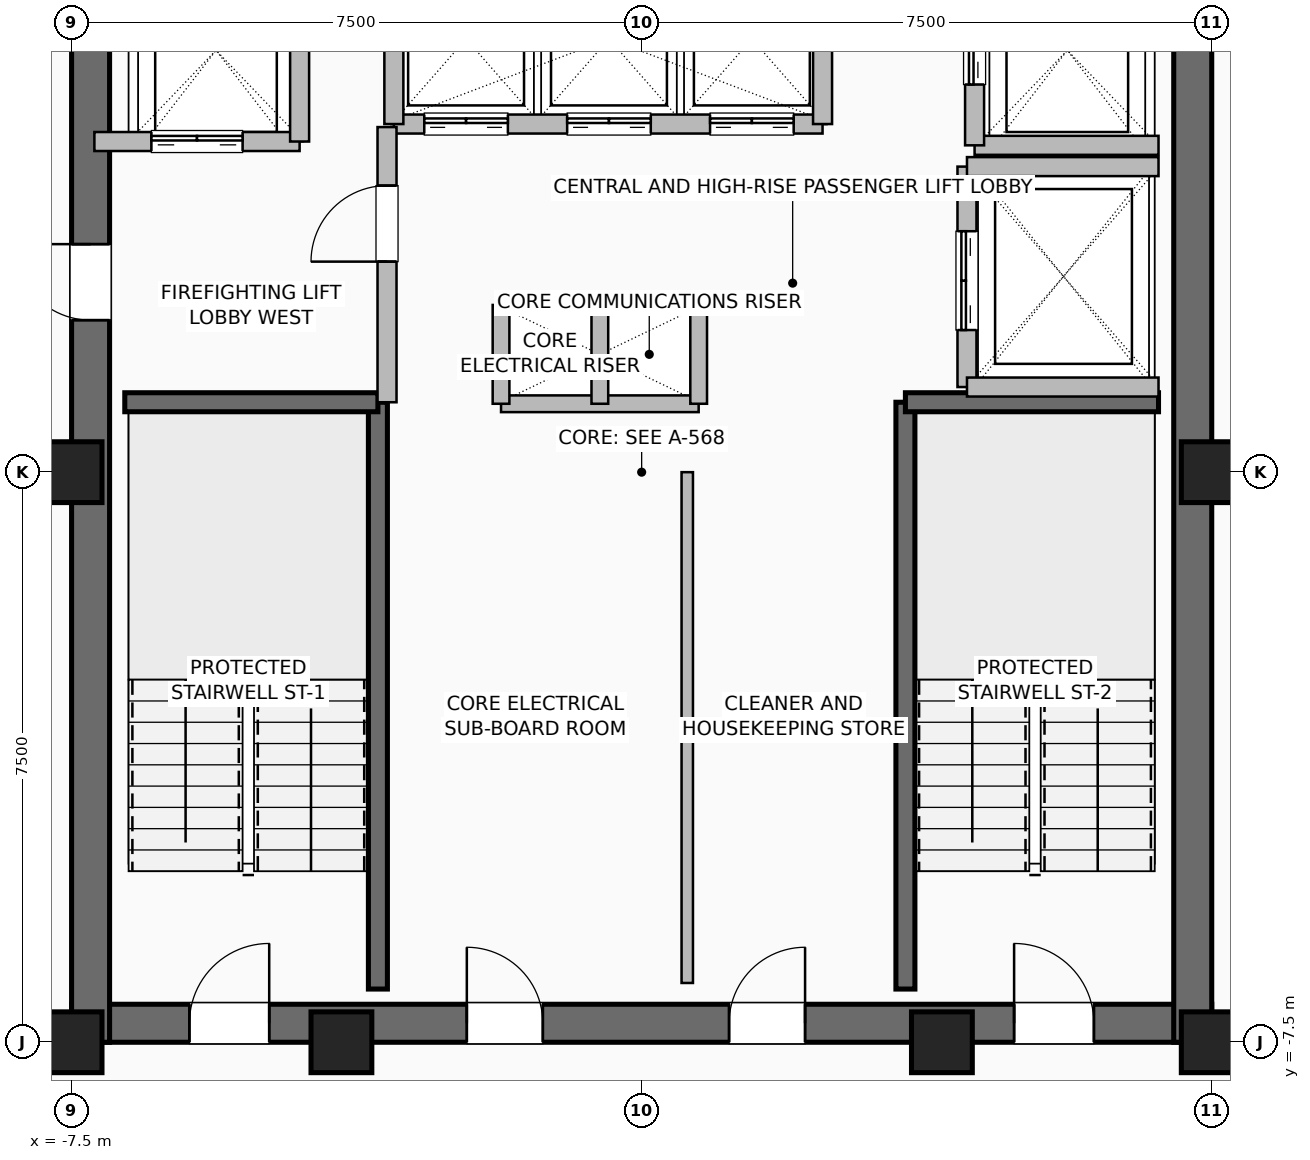
"""IFC4 building model, lengths in metres.
Left out: names, types, materials, properties, quantities, classifications, styles, units other than length and angle.
Written with IfcOpenShell. Run it as: python <this file> out.ifc"""

import sys

from ifc_helpers import new_model, si_unit, direction, frame, frame_2d, origin, origin_2d, place, context, subcontext, project, spatial, rectangle, hollow_rectangle, extrude, element, fill, save


model = new_model("IFC4")
c1 = context("Model", 3, precision=1e-05, world=origin(), true_north=direction((0.0, 1.0)))
c2 = subcontext(c1, "Body", "Model", "MODEL_VIEW")
j1 = project(units=[si_unit("LENGTHUNIT", "METRE"), si_unit("PLANEANGLEUNIT", "RADIAN")], contexts=[c1])
p1 = place(None, origin())
s1 = spatial("IfcSite", under=j1, at=p1, CompositionType="ELEMENT")
p2 = place(p1, origin())
s2 = spatial("IfcBuilding", under=s1, at=p2, CompositionType="ELEMENT")
p3 = place(p2, frame((0.0, 0.0, 272.0)))
s3 = spatial("IfcBuildingStorey", under=s2, at=p3, CompositionType="ELEMENT", Elevation=272.0)
for number, where, z_axis, x_axis in (
    (1, (-7.5, -7.5, 0.0), (0.0, 0.0, 1.0), (1.0, 0.0, 0.0)),
    (2, (-3.95, -7.5, 0.0), (0.0, 0.0, 1.0), (1.0, 0.0, 0.0)),
    (3, (3.95, -7.5, 0.0), (0.0, 0.0, 1.0), (1.0, 0.0, 0.0)),
    (4, (7.5, -7.5, 0.0), (0.0, 0.0, 1.0), (1.0, 0.0, 0.0)),
    (5, (7.5, 0.0, 0.0), (0.0, 0.0, 1.0), (1.0, 0.0, 0.0)),
    (6, (-7.5, 0.0, 0.0), (0.0, 0.0, 1.0), (1.0, 0.0, 0.0)),
):
    element("IfcColumn", number, at=place(p3, frame(where, z_axis=z_axis, x_axis=x_axis)), inside=s3, PredefinedType="COLUMN", context=c2, shape_type="SweptSolid", body=[
        extrude(hollow_rectangle(XDim=0.8, YDim=0.8, WallThickness=0.04, at=origin_2d()), origin(), (0.0, 0.0, 1.0), 3.6),
    ])
p4 = place(p3, frame((-7.5, -7.25, 0.0), z_axis=(0.0, 0.0, 1.0), x_axis=(1.0, 0.0, 0.0)))
e7 = element("IfcWall", 7, at=p4, inside=s3, PredefinedType="SHEAR", context=c2, shape_type="SweptSolid", body=[
    extrude(rectangle(XDim=15.0, YDim=0.5, at=frame_2d((7.5, 0.0))), origin(), (0.0, 0.0, 1.0), 3.36),
])
p5 = place(p4, frame((1.55, 0.0, 0.0)))
e8 = element("IfcOpeningElement", 8, at=p5, cuts=e7, PredefinedType="OPENING", context=c2, shape_type="SweptSolid", body=[
    extrude(rectangle(XDim=1.05, YDim=2.08, at=frame_2d((0.525, 1.04))), frame((0.0, 0.26, 0.0), z_axis=(0.0, -1.0, 0.0), x_axis=(1.0, 0.0, 0.0)), (0.0, 0.0, 1.0), 0.52),
])
p6 = place(p4, frame((12.4, 0.0, 0.0)))
e9 = element("IfcOpeningElement", 9, at=p6, cuts=e7, PredefinedType="OPENING", context=c2, shape_type="SweptSolid", body=[
    extrude(rectangle(XDim=1.05, YDim=2.08, at=frame_2d((0.525, 1.04))), frame((0.0, 0.26, 0.0), z_axis=(0.0, -1.0, 0.0), x_axis=(1.0, 0.0, 0.0)), (0.0, 0.0, 1.0), 0.52),
])
p7 = place(p4, frame((5.2, 0.0, 0.0)))
e10 = element("IfcOpeningElement", 10, at=p7, cuts=e7, PredefinedType="OPENING", context=c2, shape_type="SweptSolid", body=[
    extrude(rectangle(XDim=1.0, YDim=2.08, at=frame_2d((0.5, 1.04))), frame((0.0, 0.26, 0.0), z_axis=(0.0, -1.0, 0.0), x_axis=(1.0, 0.0, 0.0)), (0.0, 0.0, 1.0), 0.52),
])
p8 = place(p4, frame((8.65, 0.0, 0.0)))
e11 = element("IfcOpeningElement", 11, at=p8, cuts=e7, PredefinedType="OPENING", context=c2, shape_type="SweptSolid", body=[
    extrude(rectangle(XDim=1.0, YDim=2.08, at=frame_2d((0.5, 1.04))), frame((0.0, 0.26, 0.0), z_axis=(0.0, -1.0, 0.0), x_axis=(1.0, 0.0, 0.0)), (0.0, 0.0, 1.0), 0.52),
])
p9 = place(p3, frame((-7.25, -7.5, 0.0), z_axis=(0.0, 0.0, 1.0), x_axis=(0.0, 1.0, 0.0)))
e12 = element("IfcWall", 12, at=p9, inside=s3, PredefinedType="SHEAR", context=c2, shape_type="SweptSolid", body=[
    extrude(rectangle(XDim=15.0, YDim=0.5, at=frame_2d((7.5, 0.0))), origin(), (0.0, 0.0, 1.0), 3.36),
])
p10 = place(p9, frame((9.5, 0.0, 0.0)))
e13 = element("IfcOpeningElement", 13, at=p10, cuts=e12, PredefinedType="OPENING", context=c2, shape_type="SweptSolid", body=[
    extrude(rectangle(XDim=1.0, YDim=2.08, at=frame_2d((0.5, 1.04))), frame((0.0, 0.26, 0.0), z_axis=(0.0, -1.0, 0.0), x_axis=(1.0, 0.0, 0.0)), (0.0, 0.0, 1.0), 0.52),
])
p11 = place(p3, frame((7.25, -7.5, 0.0), z_axis=(0.0, 0.0, 1.0), x_axis=(0.0, 1.0, 0.0)))
e14 = element("IfcWall", 14, at=p11, inside=s3, PredefinedType="SHEAR", context=c2, shape_type="SweptSolid", body=[
    extrude(rectangle(XDim=15.0, YDim=0.5, at=frame_2d((7.5, 0.0))), origin(), (0.0, 0.0, 1.0), 3.36),
])
p12 = place(p3, frame((-3.47, -6.8, 0.0), z_axis=(0.0, 0.0, 1.0), x_axis=(0.0, 1.0, 0.0)))
e15 = element("IfcWall", 15, at=p12, inside=s3, PredefinedType="SHEAR", context=c2, shape_type="SweptSolid", body=[
    extrude(rectangle(XDim=7.72, YDim=0.25, at=frame_2d((3.86, 0.0))), origin(), (0.0, 0.0, 1.0), 3.36),
])
p13 = place(p3, frame((-6.8, 0.92, 0.0), z_axis=(0.0, 0.0, 1.0), x_axis=(1.0, 0.0, 0.0)))
e16 = element("IfcWall", 16, at=p13, inside=s3, PredefinedType="SHEAR", context=c2, shape_type="SweptSolid", body=[
    extrude(rectangle(XDim=3.33, YDim=0.25, at=frame_2d((1.665, 0.0))), origin(), (0.0, 0.0, 1.0), 3.36),
])
p14 = place(p3, frame((3.47, -6.8, 0.0), z_axis=(0.0, 0.0, 1.0), x_axis=(0.0, 1.0, 0.0)))
e17 = element("IfcWall", 17, at=p14, inside=s3, PredefinedType="SHEAR", context=c2, shape_type="SweptSolid", body=[
    extrude(rectangle(XDim=7.72, YDim=0.25, at=frame_2d((3.86, 0.0))), origin(), (0.0, 0.0, 1.0), 3.36),
])
p15 = place(p3, frame((3.47, 0.92, 0.0), z_axis=(0.0, 0.0, 1.0), x_axis=(1.0, 0.0, 0.0)))
e18 = element("IfcWall", 18, at=p15, inside=s3, PredefinedType="SHEAR", context=c2, shape_type="SweptSolid", body=[
    extrude(rectangle(XDim=3.33, YDim=0.25, at=frame_2d((1.665, 0.0))), origin(), (0.0, 0.0, 1.0), 3.36),
])
for number, where, z_axis, x_axis in (
    (19, (-1.85, 2.2, 0.0), (0.0, 0.0, 1.0), (1.0, 0.0, 0.0)),
    (20, (-1.85, 0.9, 0.0), (0.0, 0.0, 1.0), (1.0, 0.0, 0.0)),
):
    element("IfcWall", number, at=place(p3, frame(where, z_axis=z_axis, x_axis=x_axis)), inside=s3, PredefinedType="PARTITIONING", context=c2, shape_type="SweptSolid", body=[
        extrude(rectangle(XDim=2.6, YDim=0.22, at=frame_2d((1.3, 0.0))), origin(), (0.0, 0.0, 1.0), 3.36),
    ])
for number, where, z_axis, x_axis in (
    (21, (-0.55, 0.9, 0.0), (0.0, 0.0, 1.0), (0.0, 1.0, 0.0)),
    (22, (0.75, 0.9, 0.0), (0.0, 0.0, 1.0), (0.0, 1.0, 0.0)),
    (23, (-1.85, 0.9, 0.0), (0.0, 0.0, 1.0), (0.0, 1.0, 0.0)),
):
    element("IfcWall", number, at=place(p3, frame(where, z_axis=z_axis, x_axis=x_axis)), inside=s3, PredefinedType="PARTITIONING", context=c2, shape_type="SweptSolid", body=[
        extrude(rectangle(XDim=1.3, YDim=0.22, at=frame_2d((0.65, 0.0))), origin(), (0.0, 0.0, 1.0), 3.36),
    ])
p16 = place(p3, frame((-3.26, 4.58, 0.0), z_axis=(0.0, 0.0, 1.0), x_axis=(1.0, 0.0, 0.0)))
e24 = element("IfcWall", 24, at=p16, inside=s3, PredefinedType="SHEAR", context=c2, shape_type="SweptSolid", body=[
    extrude(rectangle(XDim=5.64, YDim=0.25, at=frame_2d((2.82, 0.0))), origin(), (0.0, 0.0, 1.0), 3.36),
])
p17 = place(p16, frame((0.4, 0.0, 0.0)))
e25 = element("IfcOpeningElement", 25, at=p17, cuts=e24, PredefinedType="OPENING", context=c2, shape_type="SweptSolid", body=[
    extrude(rectangle(XDim=1.1, YDim=2.2, at=frame_2d((0.55, 1.1))), frame((0.0, 0.135, 0.0), z_axis=(0.0, -1.0, 0.0), x_axis=(1.0, 0.0, 0.0)), (0.0, 0.0, 1.0), 0.27),
])
p18 = place(p16, frame((2.28, 0.0, 0.0)))
e26 = element("IfcOpeningElement", 26, at=p18, cuts=e24, PredefinedType="OPENING", context=c2, shape_type="SweptSolid", body=[
    extrude(rectangle(XDim=1.1, YDim=2.2, at=frame_2d((0.55, 1.1))), frame((0.0, 0.135, 0.0), z_axis=(0.0, -1.0, 0.0), x_axis=(1.0, 0.0, 0.0)), (0.0, 0.0, 1.0), 0.27),
])
p19 = place(p16, frame((4.16, 0.0, 0.0)))
e27 = element("IfcOpeningElement", 27, at=p19, cuts=e24, PredefinedType="OPENING", context=c2, shape_type="SweptSolid", body=[
    extrude(rectangle(XDim=1.1, YDim=2.2, at=frame_2d((0.55, 1.1))), frame((0.0, 0.135, 0.0), z_axis=(0.0, -1.0, 0.0), x_axis=(1.0, 0.0, 0.0)), (0.0, 0.0, 1.0), 0.27),
])
for number, where, z_axis, x_axis in (
    (28, (-3.26, 4.58, 0.0), (0.0, 0.0, 1.0), (0.0, 1.0, 0.0)),
    (29, (2.38, 4.58, 0.0), (0.0, 0.0, 1.0), (0.0, 1.0, 0.0)),
):
    element("IfcWall", number, at=place(p3, frame(where, z_axis=z_axis, x_axis=x_axis)), inside=s3, PredefinedType="SHEAR", context=c2, shape_type="SweptSolid", body=[
        extrude(rectangle(XDim=2.22, YDim=0.25, at=frame_2d((1.11, 0.0))), origin(), (0.0, 0.0, 1.0), 3.36),
    ])
p20 = place(p3, frame((-7.2, 4.35, 0.0), z_axis=(0.0, 0.0, 1.0), x_axis=(1.0, 0.0, 0.0)))
e30 = element("IfcWall", 30, at=p20, inside=s3, PredefinedType="SHEAR", context=c2, shape_type="SweptSolid", body=[
    extrude(rectangle(XDim=2.7, YDim=0.25, at=frame_2d((1.35, 0.0))), origin(), (0.0, 0.0, 1.0), 3.36),
])
p21 = place(p20, frame((0.75, 0.0, 0.0)))
e31 = element("IfcOpeningElement", 31, at=p21, cuts=e30, PredefinedType="OPENING", context=c2, shape_type="SweptSolid", body=[
    extrude(rectangle(XDim=1.2, YDim=2.2, at=frame_2d((0.6, 1.1))), frame((0.0, 0.135, 0.0), z_axis=(0.0, -1.0, 0.0), x_axis=(1.0, 0.0, 0.0)), (0.0, 0.0, 1.0), 0.27),
])
p22 = place(p3, frame((-4.5, 4.35, 0.0), z_axis=(0.0, 0.0, 1.0), x_axis=(0.0, 1.0, 0.0)))
e32 = element("IfcWall", 32, at=p22, inside=s3, PredefinedType="SHEAR", context=c2, shape_type="SweptSolid", body=[
    extrude(rectangle(XDim=2.85, YDim=0.25, at=frame_2d((1.425, 0.0))), origin(), (0.0, 0.0, 1.0), 3.36),
])
p23 = place(p3, frame((4.38, 4.3, 0.0), z_axis=(0.0, 0.0, 1.0), x_axis=(1.0, 0.0, 0.0)))
e33 = element("IfcWall", 33, at=p23, inside=s3, PredefinedType="SHEAR", context=c2, shape_type="SweptSolid", body=[
    extrude(rectangle(XDim=2.42, YDim=0.25, at=frame_2d((1.21, 0.0))), origin(), (0.0, 0.0, 1.0), 3.36),
])
p24 = place(p3, frame((4.38, 4.3, 0.0), z_axis=(0.0, 0.0, 1.0), x_axis=(0.0, 1.0, 0.0)))
e34 = element("IfcWall", 34, at=p24, inside=s3, PredefinedType="SHEAR", context=c2, shape_type="SweptSolid", body=[
    extrude(rectangle(XDim=2.5, YDim=0.25, at=frame_2d((1.25, 0.0))), origin(), (0.0, 0.0, 1.0), 3.36),
])
p25 = place(p24, frame((0.8, 0.0, 0.0)))
e35 = element("IfcOpeningElement", 35, at=p25, cuts=e34, PredefinedType="OPENING", context=c2, shape_type="SweptSolid", body=[
    extrude(rectangle(XDim=1.2, YDim=2.2, at=frame_2d((0.6, 1.1))), frame((0.0, 0.135, 0.0), z_axis=(0.0, -1.0, 0.0), x_axis=(1.0, 0.0, 0.0)), (0.0, 0.0, 1.0), 0.27),
])
p26 = place(p3, frame((4.28, 1.12, 0.0), z_axis=(0.0, 0.0, 1.0), x_axis=(0.0, 1.0, 0.0)))
e36 = element("IfcWall", 36, at=p26, inside=s3, PredefinedType="SHEAR", context=c2, shape_type="SweptSolid", body=[
    extrude(rectangle(XDim=2.9, YDim=0.25, at=frame_2d((1.45, 0.0))), origin(), (0.0, 0.0, 1.0), 3.36),
])
p27 = place(p26, frame((0.75, 0.0, 0.0)))
e37 = element("IfcOpeningElement", 37, at=p27, cuts=e36, PredefinedType="OPENING", context=c2, shape_type="SweptSolid", body=[
    extrude(rectangle(XDim=1.3, YDim=2.3, at=frame_2d((0.65, 1.15))), frame((0.0, 0.135, 0.0), z_axis=(0.0, -1.0, 0.0), x_axis=(1.0, 0.0, 0.0)), (0.0, 0.0, 1.0), 0.27),
])
for number, where, z_axis, x_axis in (
    (38, (4.28, 1.12, 0.0), (0.0, 0.0, 1.0), (1.0, 0.0, 0.0)),
    (39, (4.28, 4.02, 0.0), (0.0, 0.0, 1.0), (1.0, 0.0, 0.0)),
):
    element("IfcWall", number, at=place(p3, frame(where, z_axis=z_axis, x_axis=x_axis)), inside=s3, PredefinedType="SHEAR", context=c2, shape_type="SweptSolid", body=[
        extrude(rectangle(XDim=2.52, YDim=0.25, at=frame_2d((1.26, 0.0))), origin(), (0.0, 0.0, 1.0), 3.36),
    ])
p28 = place(p3, frame((-3.35, 0.92, 0.0), z_axis=(0.0, 0.0, 1.0), x_axis=(0.0, 1.0, 0.0)))
e40 = element("IfcWall", 40, at=p28, inside=s3, PredefinedType="SHEAR", context=c2, shape_type="SweptSolid", body=[
    extrude(rectangle(XDim=3.62, YDim=0.25, at=frame_2d((1.81, 0.0))), origin(), (0.0, 0.0, 1.0), 3.36),
])
p29 = place(p28, frame((1.85, 0.0, 0.0)))
e41 = element("IfcOpeningElement", 41, at=p29, cuts=e40, PredefinedType="OPENING", context=c2, shape_type="SweptSolid", body=[
    extrude(rectangle(XDim=1.0, YDim=2.08, at=frame_2d((0.5, 1.04))), frame((0.0, 0.135, 0.0), z_axis=(0.0, -1.0, 0.0), x_axis=(1.0, 0.0, 0.0)), (0.0, 0.0, 1.0), 0.27),
])
p30 = place(p3, frame((0.6, -6.72, 0.0), z_axis=(0.0, 0.0, 1.0), x_axis=(0.0, 1.0, 0.0)))
e42 = element("IfcWall", 42, at=p30, inside=s3, PredefinedType="PARTITIONING", context=c2, shape_type="SweptSolid", body=[
    extrude(rectangle(XDim=6.72, YDim=0.15, at=frame_2d((3.36, 0.0))), origin(), (0.0, 0.0, 1.0), 3.36),
])
p31 = place(p3, frame((7.45, -7.48, 0.0), z_axis=(0.0, 0.0, 1.0), x_axis=(1.0, 0.0, 0.0)))
e43 = element("IfcWall", 43, at=p31, inside=s3, PredefinedType="PARTITIONING", context=c2, shape_type="SweptSolid", body=[
    extrude(rectangle(XDim=0.95, YDim=0.15, at=frame_2d((0.475, 0.0))), origin(), (0.0, 0.0, 1.0), 3.36),
])
p32 = place(p5, origin())
e44 = element("IfcDoor", 44, at=p32, inside=s3, OperationType="SINGLE_SWING_RIGHT", PredefinedType="DOOR", context=c2, shape_type="SweptSolid", body=[
    extrude(rectangle(XDim=1.05, YDim=2.08, at=frame_2d((0.525, 1.04))), frame((0.0, 0.025, 0.0), z_axis=(0.0, -1.0, 0.0), x_axis=(1.0, 0.0, 0.0)), (0.0, 0.0, 1.0), 0.05),
])
fill(e8, e44)
p33 = place(p6, origin())
e45 = element("IfcDoor", 45, at=p33, inside=s3, OperationType="SINGLE_SWING_LEFT", PredefinedType="DOOR", context=c2, shape_type="SweptSolid", body=[
    extrude(rectangle(XDim=1.05, YDim=2.08, at=frame_2d((0.525, 1.04))), frame((0.0, 0.025, 0.0), z_axis=(0.0, -1.0, 0.0), x_axis=(1.0, 0.0, 0.0)), (0.0, 0.0, 1.0), 0.05),
])
fill(e9, e45)
p34 = place(p10, origin())
e46 = element("IfcDoor", 46, at=p34, inside=s3, OperationType="SINGLE_SWING_RIGHT", PredefinedType="DOOR", context=c2, shape_type="SweptSolid", body=[
    extrude(rectangle(XDim=1.0, YDim=2.08, at=frame_2d((0.5, 1.04))), frame((0.0, 0.025, 0.0), z_axis=(0.0, -1.0, 0.0), x_axis=(1.0, 0.0, 0.0)), (0.0, 0.0, 1.0), 0.05),
])
fill(e13, e46)
p35 = place(p7, origin())
e47 = element("IfcDoor", 47, at=p35, inside=s3, OperationType="SINGLE_SWING_LEFT", PredefinedType="DOOR", context=c2, shape_type="SweptSolid", body=[
    extrude(rectangle(XDim=1.0, YDim=2.08, at=frame_2d((0.5, 1.04))), frame((0.0, 0.025, 0.0), z_axis=(0.0, -1.0, 0.0), x_axis=(1.0, 0.0, 0.0)), (0.0, 0.0, 1.0), 0.05),
])
fill(e10, e47)
p36 = place(p8, origin())
e48 = element("IfcDoor", 48, at=p36, inside=s3, OperationType="SINGLE_SWING_RIGHT", PredefinedType="DOOR", context=c2, shape_type="SweptSolid", body=[
    extrude(rectangle(XDim=1.0, YDim=2.08, at=frame_2d((0.5, 1.04))), frame((0.0, 0.025, 0.0), z_axis=(0.0, -1.0, 0.0), x_axis=(1.0, 0.0, 0.0)), (0.0, 0.0, 1.0), 0.05),
])
fill(e11, e48)
p37 = place(p17, origin())
e49 = element("IfcDoor", 49, at=p37, inside=s3, OperationType="DOUBLE_DOOR_SLIDING", PredefinedType="DOOR", context=c2, shape_type="SweptSolid", body=[
    extrude(rectangle(XDim=1.1, YDim=2.2, at=frame_2d((0.55, 1.1))), frame((0.0, 0.025, 0.0), z_axis=(0.0, -1.0, 0.0), x_axis=(1.0, 0.0, 0.0)), (0.0, 0.0, 1.0), 0.05),
])
fill(e25, e49)
p38 = place(p18, origin())
e50 = element("IfcDoor", 50, at=p38, inside=s3, OperationType="DOUBLE_DOOR_SLIDING", PredefinedType="DOOR", context=c2, shape_type="SweptSolid", body=[
    extrude(rectangle(XDim=1.1, YDim=2.2, at=frame_2d((0.55, 1.1))), frame((0.0, 0.025, 0.0), z_axis=(0.0, -1.0, 0.0), x_axis=(1.0, 0.0, 0.0)), (0.0, 0.0, 1.0), 0.05),
])
fill(e26, e50)
p39 = place(p19, origin())
e51 = element("IfcDoor", 51, at=p39, inside=s3, OperationType="DOUBLE_DOOR_SLIDING", PredefinedType="DOOR", context=c2, shape_type="SweptSolid", body=[
    extrude(rectangle(XDim=1.1, YDim=2.2, at=frame_2d((0.55, 1.1))), frame((0.0, 0.025, 0.0), z_axis=(0.0, -1.0, 0.0), x_axis=(1.0, 0.0, 0.0)), (0.0, 0.0, 1.0), 0.05),
])
fill(e27, e51)
p40 = place(p21, origin())
e52 = element("IfcDoor", 52, at=p40, inside=s3, OperationType="DOUBLE_DOOR_SLIDING", PredefinedType="DOOR", context=c2, shape_type="SweptSolid", body=[
    extrude(rectangle(XDim=1.2, YDim=2.2, at=frame_2d((0.6, 1.1))), frame((0.0, 0.025, 0.0), z_axis=(0.0, -1.0, 0.0), x_axis=(1.0, 0.0, 0.0)), (0.0, 0.0, 1.0), 0.05),
])
fill(e31, e52)
p41 = place(p25, origin())
e53 = element("IfcDoor", 53, at=p41, inside=s3, OperationType="DOUBLE_DOOR_SLIDING", PredefinedType="DOOR", context=c2, shape_type="SweptSolid", body=[
    extrude(rectangle(XDim=1.2, YDim=2.2, at=frame_2d((0.6, 1.1))), frame((0.0, 0.025, 0.0), z_axis=(0.0, -1.0, 0.0), x_axis=(1.0, 0.0, 0.0)), (0.0, 0.0, 1.0), 0.05),
])
fill(e35, e53)
p42 = place(p27, origin())
e54 = element("IfcDoor", 54, at=p42, inside=s3, OperationType="DOUBLE_DOOR_SLIDING", PredefinedType="DOOR", context=c2, shape_type="SweptSolid", body=[
    extrude(rectangle(XDim=1.3, YDim=2.3, at=frame_2d((0.65, 1.15))), frame((0.0, 0.025, 0.0), z_axis=(0.0, -1.0, 0.0), x_axis=(1.0, 0.0, 0.0)), (0.0, 0.0, 1.0), 0.05),
])
fill(e37, e54)
p43 = place(p29, origin())
e55 = element("IfcDoor", 55, at=p43, inside=s3, OperationType="SINGLE_SWING_LEFT", PredefinedType="DOOR", context=c2, shape_type="SweptSolid", body=[
    extrude(rectangle(XDim=1.0, YDim=2.08, at=frame_2d((0.5, 1.04))), frame((0.0, 0.025, 0.0), z_axis=(0.0, -1.0, 0.0), x_axis=(1.0, 0.0, 0.0)), (0.0, 0.0, 1.0), 0.05),
])
fill(e41, e55)
save(model, sys.argv[1])
